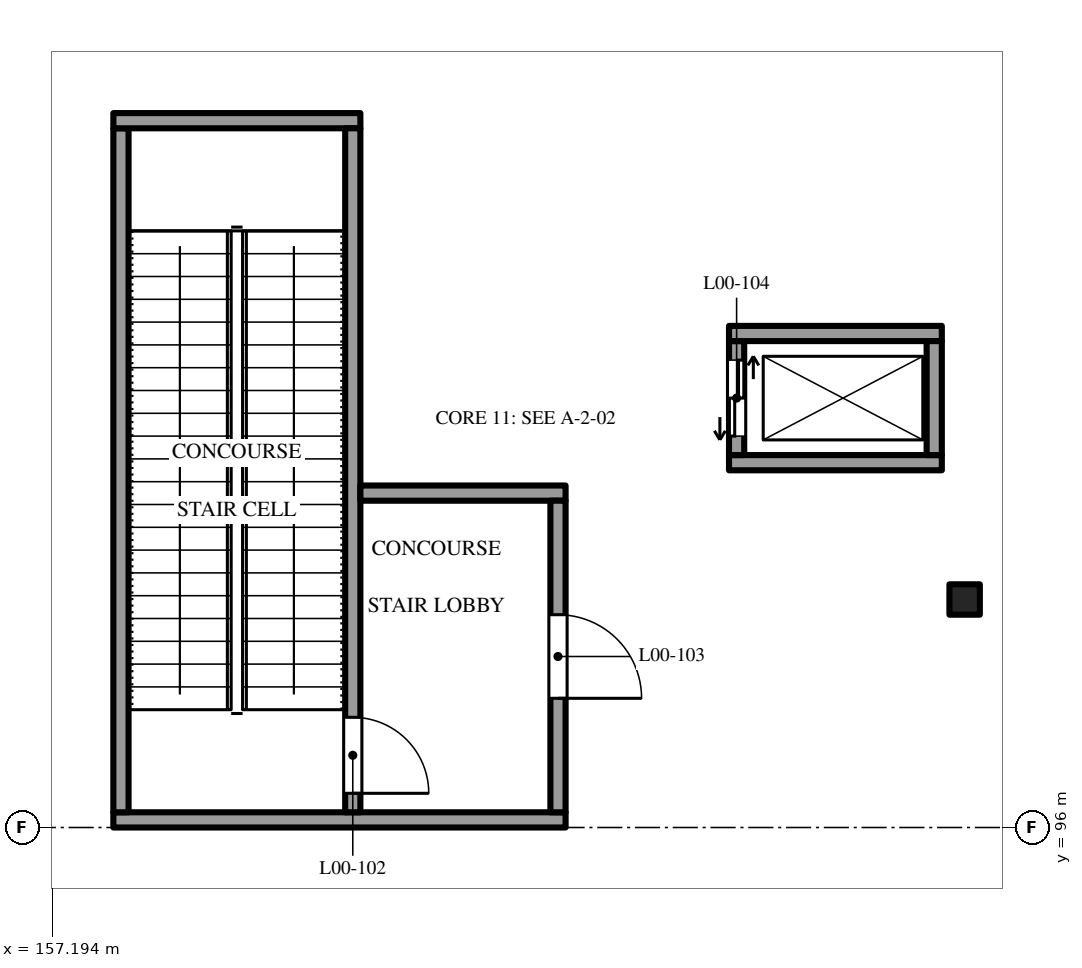
"""IFC4 building model, lengths in metres.
Left out: names, types, materials, properties, quantities, classifications, styles, units other than length and angle.
Written with IfcOpenShell. Run it as: python <this file> out.ifc"""

import sys

from ifc_helpers import new_model, si_unit, direction, frame, frame_2d, origin, origin_2d, place, context, subcontext, project, spatial, rectangle, extrude, element, fill, save


model = new_model("IFC4")
c1 = context("Model", 3, precision=1e-05, world=origin(), true_north=direction((0.0, 1.0)))
c2 = subcontext(c1, "Body", "Model", "MODEL_VIEW")
j1 = project(units=[si_unit("LENGTHUNIT", "METRE"), si_unit("PLANEANGLEUNIT", "RADIAN")], contexts=[c1])
p1 = place(None, origin())
s1 = spatial("IfcSite", under=j1, at=p1, CompositionType="ELEMENT")
p2 = place(p1, origin())
s2 = spatial("IfcBuilding", under=s1, at=p2, CompositionType="ELEMENT")
p3 = place(p2, origin())
s3 = spatial("IfcBuildingStorey", under=s2, at=p3, CompositionType="ELEMENT", Elevation=0.0)
p4 = place(p3, frame((158.0, 96.1, 0.0), z_axis=(0.0, 0.0, 1.0), x_axis=(1.0, 0.0, 0.0)))
e1 = element("IfcWall", 1, at=p4, inside=s3, PredefinedType="SOLIDWALL", context=c2, shape_type="SweptSolid", body=[
    extrude(rectangle(XDim=5.95, YDim=0.2, at=frame_2d((2.975, 0.0))), origin(), (0.0, 0.0, 1.0), 6.75),
])
p5 = place(p3, frame((158.1, 96.2, 0.0), z_axis=(0.0, 0.0, 1.0), x_axis=(0.0, 1.0, 0.0)))
e2 = element("IfcWall", 2, at=p5, inside=s3, PredefinedType="SOLIDWALL", context=c2, shape_type="SweptSolid", body=[
    extrude(rectangle(XDim=9.0, YDim=0.2, at=frame_2d((4.5, 0.0))), origin(), (0.0, 0.0, 1.0), 6.75),
])
p6 = place(p3, frame((158.0, 105.3, 0.0), z_axis=(0.0, 0.0, 1.0), x_axis=(1.0, 0.0, 0.0)))
e3 = element("IfcWall", 3, at=p6, inside=s3, PredefinedType="SOLIDWALL", context=c2, shape_type="SweptSolid", body=[
    extrude(rectangle(XDim=3.25, YDim=0.2, at=frame_2d((1.625, 0.0))), origin(), (0.0, 0.0, 1.0), 6.75),
])
p7 = place(p3, frame((161.15, 96.2, 0.0), z_axis=(0.0, 0.0, 1.0), x_axis=(0.0, 1.0, 0.0)))
e4 = element("IfcWall", 4, at=p7, inside=s3, PredefinedType="SOLIDWALL", context=c2, shape_type="SweptSolid", body=[
    extrude(rectangle(XDim=9.0, YDim=0.2, at=frame_2d((4.5, 0.0))), origin(), (0.0, 0.0, 1.0), 6.75),
])
p8 = place(p7, frame((0.25, 0.0, 0.0)))
e5 = element("IfcOpeningElement", 5, at=p8, cuts=e4, PredefinedType="OPENING", context=c2, shape_type="SweptSolid", body=[
    extrude(rectangle(XDim=1.0, YDim=2.1, at=frame_2d((0.5, 1.05))), frame((0.0, 0.11, 0.0), z_axis=(0.0, -1.0, 0.0), x_axis=(1.0, 0.0, 0.0)), (0.0, 0.0, 1.0), 0.22),
])
p9 = place(p3, frame((161.25, 100.4, 0.0), z_axis=(0.0, 0.0, 1.0), x_axis=(1.0, 0.0, 0.0)))
e6 = element("IfcWall", 6, at=p9, inside=s3, PredefinedType="SOLIDWALL", context=c2, shape_type="SweptSolid", body=[
    extrude(rectangle(XDim=2.7, YDim=0.2, at=frame_2d((1.35, 0.0))), origin(), (0.0, 0.0, 1.0), 6.75),
])
p10 = place(p3, frame((163.85, 96.2, 0.0), z_axis=(0.0, 0.0, 1.0), x_axis=(0.0, 1.0, 0.0)))
e7 = element("IfcWall", 7, at=p10, inside=s3, PredefinedType="SOLIDWALL", context=c2, shape_type="SweptSolid", body=[
    extrude(rectangle(XDim=4.1, YDim=0.2, at=frame_2d((2.05, 0.0))), origin(), (0.0, 0.0, 1.0), 6.75),
])
p11 = place(p10, frame((1.5, 0.0, 0.0)))
e8 = element("IfcOpeningElement", 8, at=p11, cuts=e7, PredefinedType="OPENING", context=c2, shape_type="SweptSolid", body=[
    extrude(rectangle(XDim=1.1, YDim=2.1, at=frame_2d((0.55, 1.05))), frame((0.0, 0.11, 0.0), z_axis=(0.0, -1.0, 0.0), x_axis=(1.0, 0.0, 0.0)), (0.0, 0.0, 1.0), 0.22),
])
p12 = place(p3, frame((166.1, 100.8, -1.2), z_axis=(0.0, 0.0, 1.0), x_axis=(1.0, 0.0, 0.0)))
e9 = element("IfcWall", 9, at=p12, inside=s3, PredefinedType="SOLIDWALL", context=c2, shape_type="SweptSolid", body=[
    extrude(rectangle(XDim=2.8, YDim=0.2, at=frame_2d((1.4, 0.0))), origin(), (0.0, 0.0, 1.0), 7.95),
])
p13 = place(p3, frame((166.2, 100.9, -1.2), z_axis=(0.0, 0.0, 1.0), x_axis=(0.0, 1.0, 0.0)))
e10 = element("IfcWall", 10, at=p13, inside=s3, PredefinedType="SOLIDWALL", context=c2, shape_type="SweptSolid", body=[
    extrude(rectangle(XDim=1.5, YDim=0.2, at=frame_2d((0.75, 0.0))), origin(), (0.0, 0.0, 1.0), 7.95),
])
p14 = place(p13, frame((0.25, 0.0, 1.2)))
e11 = element("IfcOpeningElement", 11, at=p14, cuts=e10, PredefinedType="OPENING", context=c2, shape_type="SweptSolid", body=[
    extrude(rectangle(XDim=1.0, YDim=2.1, at=frame_2d((0.5, 1.05))), frame((0.0, 0.11, 0.0), z_axis=(0.0, -1.0, 0.0), x_axis=(1.0, 0.0, 0.0)), (0.0, 0.0, 1.0), 0.22),
])
p15 = place(p3, frame((166.1, 102.5, -1.2), z_axis=(0.0, 0.0, 1.0), x_axis=(1.0, 0.0, 0.0)))
e12 = element("IfcWall", 12, at=p15, inside=s3, PredefinedType="SOLIDWALL", context=c2, shape_type="SweptSolid", body=[
    extrude(rectangle(XDim=2.8, YDim=0.2, at=frame_2d((1.4, 0.0))), origin(), (0.0, 0.0, 1.0), 7.95),
])
p16 = place(p3, frame((168.8, 100.9, -1.2), z_axis=(0.0, 0.0, 1.0), x_axis=(0.0, 1.0, 0.0)))
e13 = element("IfcWall", 13, at=p16, inside=s3, PredefinedType="SOLIDWALL", context=c2, shape_type="SweptSolid", body=[
    extrude(rectangle(XDim=1.5, YDim=0.2, at=frame_2d((0.75, 0.0))), origin(), (0.0, 0.0, 1.0), 7.95),
])
p17 = place(p3, frame((169.2, 99.0, -0.4), z_axis=(0.0, 0.0, 1.0), x_axis=(1.0, 0.0, 0.0)))
e14 = element("IfcColumn", 14, at=p17, inside=s3, PredefinedType="COLUMN", context=c2, shape_type="SweptSolid", body=[
    extrude(rectangle(XDim=0.4, YDim=0.4, at=origin_2d()), origin(), (0.0, 0.0, 1.0), 7.15),
])
p18 = place(p8, frame((1.0, 0.0, 0.0), z_axis=(0.0, 0.0, 1.0), x_axis=(-1.0, 0.0, 0.0)))
e15 = element("IfcDoor", 15, at=p18, inside=s3, OperationType="SINGLE_SWING_RIGHT", PredefinedType="DOOR", context=c2, shape_type="SweptSolid", body=[
    extrude(rectangle(XDim=1.0, YDim=2.1, at=frame_2d((0.5, 1.05))), frame((0.0, 0.025, 0.0), z_axis=(0.0, -1.0, 0.0), x_axis=(1.0, 0.0, 0.0)), (0.0, 0.0, 1.0), 0.05),
])
fill(e5, e15)
p19 = place(p11, frame((1.1, 0.0, 0.0), z_axis=(0.0, 0.0, 1.0), x_axis=(-1.0, 0.0, 0.0)))
e16 = element("IfcDoor", 16, at=p19, inside=s3, OperationType="SINGLE_SWING_LEFT", PredefinedType="DOOR", context=c2, shape_type="SweptSolid", body=[
    extrude(rectangle(XDim=1.1, YDim=2.1, at=frame_2d((0.55, 1.05))), frame((0.0, 0.025, 0.0), z_axis=(0.0, -1.0, 0.0), x_axis=(1.0, 0.0, 0.0)), (0.0, 0.0, 1.0), 0.05),
])
fill(e8, e16)
p20 = place(p14, origin())
e17 = element("IfcDoor", 17, at=p20, inside=s3, OperationType="DOUBLE_DOOR_SLIDING", PredefinedType="DOOR", context=c2, shape_type="SweptSolid", body=[
    extrude(rectangle(XDim=1.0, YDim=2.1, at=frame_2d((0.5, 1.05))), frame((0.0, 0.025, 0.0), z_axis=(0.0, -1.0, 0.0), x_axis=(1.0, 0.0, 0.0)), (0.0, 0.0, 1.0), 0.05),
])
fill(e11, e17)
save(model, sys.argv[1])
